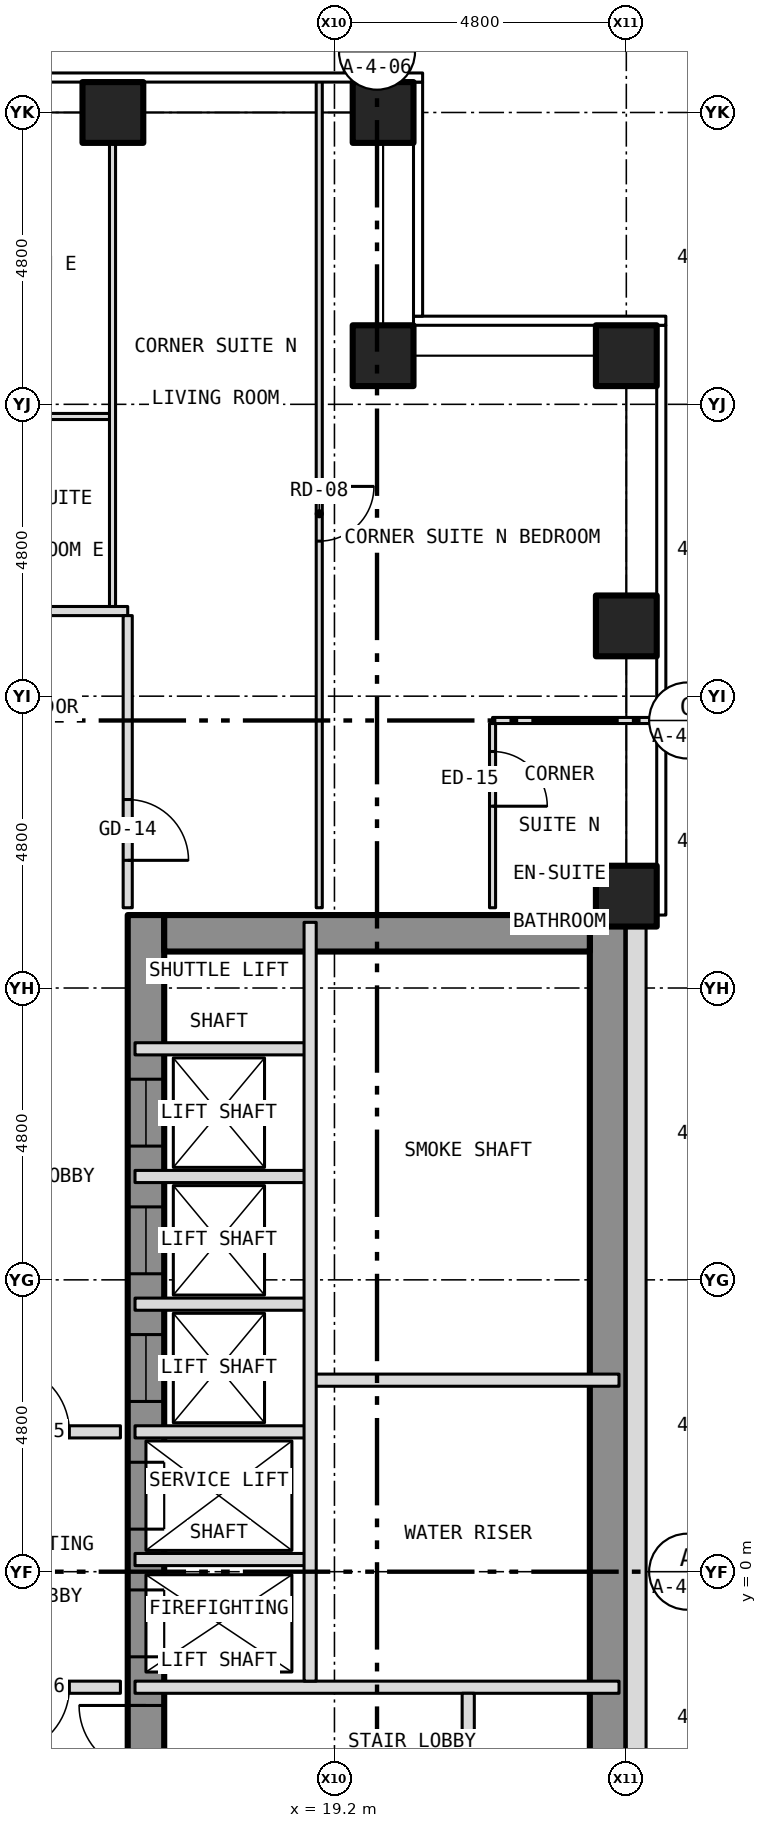
"""IFC4 building model, lengths in metres.
Left out: names, types, materials, properties, quantities, classifications, styles, units other than length and angle.
Written with IfcOpenShell. Run it as: python <this file> out.ifc"""

import sys

from ifc_helpers import new_model, si_unit, direction, frame, frame_2d, origin, origin_2d, place, context, subcontext, project, spatial, rectangle, hollow_rectangle, extrude, element, fill, save


model = new_model("IFC4")
c1 = context("Model", 3, precision=1e-05, world=origin(), true_north=direction((0.0, 1.0)))
c2 = subcontext(c1, "Body", "Model", "MODEL_VIEW")
j1 = project(units=[si_unit("LENGTHUNIT", "METRE"), si_unit("PLANEANGLEUNIT", "RADIAN")], contexts=[c1])
p1 = place(None, origin())
s1 = spatial("IfcSite", under=j1, at=p1, CompositionType="ELEMENT")
p2 = place(p1, origin())
s2 = spatial("IfcBuilding", under=s1, at=p2, CompositionType="ELEMENT")
p3 = place(p2, frame((0.0, 0.0, 42.5)))
s3 = spatial("IfcBuildingStorey", under=s2, at=p3, CompositionType="ELEMENT", Elevation=42.5)
for number, where, z_axis, x_axis in (
    (1, (15.556, 24.0, -0.15), (0.0, 0.0, 1.0), (1.0, 0.0, 0.0)),
    (2, (20.0, 24.0, -0.15), (0.0, 0.0, 1.0), (1.0, 0.0, 0.0)),
    (3, (24.0, 11.111, -0.15), (0.0, 0.0, 1.0), (1.0, 0.0, 0.0)),
    (4, (24.0, 15.556, -0.15), (0.0, 0.0, 1.0), (1.0, 0.0, 0.0)),
    (5, (24.0, 20.0, -0.15), (0.0, 0.0, 1.0), (1.0, 0.0, 0.0)),
    (6, (20.0, 20.0, -0.15), (0.0, 0.0, 1.0), (1.0, 0.0, 0.0)),
):
    element("IfcColumn", number, at=place(p3, frame(where, z_axis=z_axis, x_axis=x_axis)), inside=s3, PredefinedType="COLUMN", context=c2, shape_type="SweptSolid", body=[
        extrude(hollow_rectangle(XDim=1.0, YDim=1.0, WallThickness=0.06, at=origin_2d()), origin(), (0.0, 0.0, 1.0), 3.5),
    ])
p4 = place(p3, frame((16.1, -10.8, 0.0), z_axis=(0.0, 0.0, 1.0), x_axis=(0.0, 1.0, 0.0)))
e7 = element("IfcWall", 7, at=p4, inside=s3, PredefinedType="SHEAR", context=c2, shape_type="SweptSolid", body=[
    extrude(rectangle(XDim=21.6, YDim=0.6, at=frame_2d((10.8, 0.0))), origin(), (0.0, 0.0, 1.0), 3.25),
])
p5 = place(p4, frame((9.4, 0.0, 0.0)))
e8 = element("IfcOpeningElement", 8, at=p5, cuts=e7, PredefinedType="OPENING", context=c2, shape_type="SweptSolid", body=[
    extrude(rectangle(XDim=1.1, YDim=2.1, at=frame_2d((0.55, 1.05))), frame((0.0, 0.312, 0.0), z_axis=(0.0, -1.0, 0.0), x_axis=(1.0, 0.0, 0.0)), (0.0, 0.0, 1.0), 0.624),
])
p6 = place(p4, frame((11.5, 0.0, 0.0)))
e9 = element("IfcOpeningElement", 9, at=p6, cuts=e7, PredefinedType="OPENING", context=c2, shape_type="SweptSolid", body=[
    extrude(rectangle(XDim=1.1, YDim=2.1, at=frame_2d((0.55, 1.05))), frame((0.0, 0.312, 0.0), z_axis=(0.0, -1.0, 0.0), x_axis=(1.0, 0.0, 0.0)), (0.0, 0.0, 1.0), 0.624),
])
p7 = place(p4, frame((13.6, 0.0, 0.0)))
e10 = element("IfcOpeningElement", 10, at=p7, cuts=e7, PredefinedType="OPENING", context=c2, shape_type="SweptSolid", body=[
    extrude(rectangle(XDim=1.1, YDim=2.1, at=frame_2d((0.55, 1.05))), frame((0.0, 0.312, 0.0), z_axis=(0.0, -1.0, 0.0), x_axis=(1.0, 0.0, 0.0)), (0.0, 0.0, 1.0), 0.624),
])
p8 = place(p4, frame((15.7, 0.0, 0.0)))
e11 = element("IfcOpeningElement", 11, at=p8, cuts=e7, PredefinedType="OPENING", context=c2, shape_type="SweptSolid", body=[
    extrude(rectangle(XDim=1.1, YDim=2.1, at=frame_2d((0.55, 1.05))), frame((0.0, 0.312, 0.0), z_axis=(0.0, -1.0, 0.0), x_axis=(1.0, 0.0, 0.0)), (0.0, 0.0, 1.0), 0.624),
])
p9 = place(p4, frame((17.8, 0.0, 0.0)))
e12 = element("IfcOpeningElement", 12, at=p9, cuts=e7, PredefinedType="OPENING", context=c2, shape_type="SweptSolid", body=[
    extrude(rectangle(XDim=1.1, YDim=2.1, at=frame_2d((0.55, 1.05))), frame((0.0, 0.312, 0.0), z_axis=(0.0, -1.0, 0.0), x_axis=(1.0, 0.0, 0.0)), (0.0, 0.0, 1.0), 0.624),
])
p10 = place(p4, frame((5.642, 0.0, 0.0)))
e13 = element("IfcOpeningElement", 13, at=p10, cuts=e7, PredefinedType="OPENING", context=c2, shape_type="SweptSolid", body=[
    extrude(rectangle(XDim=1.1, YDim=2.1, at=frame_2d((0.55, 1.05))), frame((0.0, 0.312, 0.0), z_axis=(0.0, -1.0, 0.0), x_axis=(1.0, 0.0, 0.0)), (0.0, 0.0, 1.0), 0.624),
])
p11 = place(p4, frame((7.5, 0.0, 0.0)))
e14 = element("IfcOpeningElement", 14, at=p11, cuts=e7, PredefinedType="OPENING", context=c2, shape_type="SweptSolid", body=[
    extrude(rectangle(XDim=1.1, YDim=2.1, at=frame_2d((0.55, 1.05))), frame((0.0, 0.312, 0.0), z_axis=(0.0, -1.0, 0.0), x_axis=(1.0, 0.0, 0.0)), (0.0, 0.0, 1.0), 0.624),
])
p12 = place(p3, frame((23.7, -10.8, 0.0), z_axis=(0.0, 0.0, 1.0), x_axis=(0.0, 1.0, 0.0)))
e15 = element("IfcWall", 15, at=p12, inside=s3, PredefinedType="SHEAR", context=c2, shape_type="SweptSolid", body=[
    extrude(rectangle(XDim=21.6, YDim=0.6, at=frame_2d((10.8, 0.0))), origin(), (0.0, 0.0, 1.0), 3.25),
])
p13 = place(p3, frame((16.4, 10.5, 0.0), z_axis=(0.0, 0.0, 1.0), x_axis=(1.0, 0.0, 0.0)))
e16 = element("IfcWall", 16, at=p13, inside=s3, PredefinedType="SHEAR", context=c2, shape_type="SweptSolid", body=[
    extrude(rectangle(XDim=7.0, YDim=0.6, at=frame_2d((3.5, 0.0))), origin(), (0.0, 0.0, 1.0), 3.25),
])
p14 = place(p3, frame((24.163, -10.8, 0.0), z_axis=(0.0, 0.0, 1.0), x_axis=(0.0, 1.0, 0.0)))
e17 = element("IfcWall", 17, at=p14, inside=s3, PredefinedType="SOLIDWALL", context=c2, shape_type="SweptSolid", body=[
    extrude(rectangle(XDim=21.6, YDim=0.325, at=frame_2d((10.8, 0.0))), origin(), (0.0, 0.0, 1.0), 3.5),
])
p15 = place(p14, frame((2.95, 0.0, 1.0)))
e18 = element("IfcOpeningElement", 18, at=p15, cuts=e17, PredefinedType="OPENING", context=c2, shape_type="SweptSolid", body=[
    extrude(rectangle(XDim=0.6, YDim=1.5, at=frame_2d((0.3, 0.75))), frame((0.0, 0.175, 0.0), z_axis=(0.0, -1.0, 0.0), x_axis=(1.0, 0.0, 0.0)), (0.0, 0.0, 1.0), 0.349),
])
p16 = place(p3, frame((12.4, -1.9, 0.0), z_axis=(0.0, 0.0, 1.0), x_axis=(1.0, 0.0, 0.0)))
e19 = element("IfcWall", 19, at=p16, inside=s3, PredefinedType="PARTITIONING", context=c2, shape_type="SweptSolid", body=[
    extrude(rectangle(XDim=3.28, YDim=0.2, at=frame_2d((1.64, 0.0))), origin(), (0.0, 0.0, 1.0), 3.35),
])
p17 = place(p16, frame((1.34, 0.0, 0.0)))
e20 = element("IfcOpeningElement", 20, at=p17, cuts=e19, PredefinedType="OPENING", context=c2, shape_type="SweptSolid", body=[
    extrude(rectangle(XDim=1.1, YDim=2.1, at=frame_2d((0.55, 1.05))), frame((0.0, 0.112, 0.0), z_axis=(0.0, -1.0, 0.0), x_axis=(1.0, 0.0, 0.0)), (0.0, 0.0, 1.0), 0.224),
])
p18 = place(p3, frame((15.92, -1.9, 0.0), z_axis=(0.0, 0.0, 1.0), x_axis=(1.0, 0.0, 0.0)))
e21 = element("IfcWall", 21, at=p18, inside=s3, PredefinedType="PARTITIONING", context=c2, shape_type="SweptSolid", body=[
    extrude(rectangle(XDim=7.96, YDim=0.2, at=frame_2d((3.98, 0.0))), origin(), (0.0, 0.0, 1.0), 3.25),
])
p19 = place(p3, frame((15.92, 0.2, 0.0), z_axis=(0.0, 0.0, 1.0), x_axis=(1.0, 0.0, 0.0)))
e22 = element("IfcWall", 22, at=p19, inside=s3, PredefinedType="PARTITIONING", context=c2, shape_type="SweptSolid", body=[
    extrude(rectangle(XDim=2.88, YDim=0.2, at=frame_2d((1.44, 0.0))), origin(), (0.0, 0.0, 1.0), 3.25),
])
p20 = place(p3, frame((12.4, 2.3, 0.0), z_axis=(0.0, 0.0, 1.0), x_axis=(1.0, 0.0, 0.0)))
e23 = element("IfcWall", 23, at=p20, inside=s3, PredefinedType="PARTITIONING", context=c2, shape_type="SweptSolid", body=[
    extrude(rectangle(XDim=3.28, YDim=0.2, at=frame_2d((1.64, 0.0))), origin(), (0.0, 0.0, 1.0), 3.35),
])
p21 = place(p20, frame((1.34, 0.0, 0.0)))
e24 = element("IfcOpeningElement", 24, at=p21, cuts=e23, PredefinedType="OPENING", context=c2, shape_type="SweptSolid", body=[
    extrude(rectangle(XDim=1.1, YDim=2.1, at=frame_2d((0.55, 1.05))), frame((0.0, 0.112, 0.0), z_axis=(0.0, -1.0, 0.0), x_axis=(1.0, 0.0, 0.0)), (0.0, 0.0, 1.0), 0.224),
])
p22 = place(p3, frame((15.92, 2.3, 0.0), z_axis=(0.0, 0.0, 1.0), x_axis=(1.0, 0.0, 0.0)))
e25 = element("IfcWall", 25, at=p22, inside=s3, PredefinedType="PARTITIONING", context=c2, shape_type="SweptSolid", body=[
    extrude(rectangle(XDim=2.88, YDim=0.2, at=frame_2d((1.44, 0.0))), origin(), (0.0, 0.0, 1.0), 3.25),
])
p23 = place(p3, frame((18.8, 3.15, 0.0), z_axis=(0.0, 0.0, 1.0), x_axis=(1.0, 0.0, 0.0)))
e26 = element("IfcWall", 26, at=p23, inside=s3, PredefinedType="PARTITIONING", context=c2, shape_type="SweptSolid", body=[
    extrude(rectangle(XDim=5.08, YDim=0.2, at=frame_2d((2.54, 0.0))), origin(), (0.0, 0.0, 1.0), 3.25),
])
for number, where, z_axis, x_axis in (
    (27, (15.92, 4.4, 0.0), (0.0, 0.0, 1.0), (1.0, 0.0, 0.0)),
    (28, (15.92, 6.5, 0.0), (0.0, 0.0, 1.0), (1.0, 0.0, 0.0)),
    (29, (15.92, 8.6, 0.0), (0.0, 0.0, 1.0), (1.0, 0.0, 0.0)),
):
    element("IfcWall", number, at=place(p3, frame(where, z_axis=z_axis, x_axis=x_axis)), inside=s3, PredefinedType="PARTITIONING", context=c2, shape_type="SweptSolid", body=[
        extrude(rectangle(XDim=2.88, YDim=0.2, at=frame_2d((1.44, 0.0))), origin(), (0.0, 0.0, 1.0), 3.25),
    ])
p24 = place(p3, frame((21.8, 14.0, 0.0), z_axis=(0.0, 0.0, 1.0), x_axis=(1.0, 0.0, 0.0)))
e30 = element("IfcWall", 30, at=p24, inside=s3, PredefinedType="PARTITIONING", context=c2, shape_type="SweptSolid", body=[
    extrude(rectangle(XDim=2.73, YDim=0.1, at=frame_2d((1.365, 0.0))), origin(), (0.0, 0.0, 1.0), 3.35),
])
p25 = place(p3, frame((-15.8, 15.8, 0.0), z_axis=(0.0, 0.0, 1.0), x_axis=(1.0, 0.0, 0.0)))
e31 = element("IfcWall", 31, at=p25, inside=s3, PredefinedType="PARTITIONING", context=c2, shape_type="SweptSolid", body=[
    extrude(rectangle(XDim=31.6, YDim=0.15, at=frame_2d((15.8, 0.0))), origin(), (0.0, 0.0, 1.0), 3.35),
])
p26 = place(p25, frame((3.067, 0.0, 0.0)))
e32 = element("IfcOpeningElement", 32, at=p26, cuts=e31, PredefinedType="OPENING", context=c2, shape_type="SweptSolid", body=[
    extrude(rectangle(XDim=1.0, YDim=2.1, at=frame_2d((0.5, 1.05))), frame((0.0, 0.087, 0.0), z_axis=(0.0, -1.0, 0.0), x_axis=(1.0, 0.0, 0.0)), (0.0, 0.0, 1.0), 0.174),
])
p27 = place(p25, frame((6.189, 0.0, 0.0)))
e33 = element("IfcOpeningElement", 33, at=p27, cuts=e31, PredefinedType="OPENING", context=c2, shape_type="SweptSolid", body=[
    extrude(rectangle(XDim=1.0, YDim=2.1, at=frame_2d((0.5, 1.05))), frame((0.0, 0.087, 0.0), z_axis=(0.0, -1.0, 0.0), x_axis=(1.0, 0.0, 0.0)), (0.0, 0.0, 1.0), 0.174),
])
p28 = place(p25, frame((15.311, 0.0, 0.0)))
e34 = element("IfcOpeningElement", 34, at=p28, cuts=e31, PredefinedType="OPENING", context=c2, shape_type="SweptSolid", body=[
    extrude(rectangle(XDim=1.0, YDim=2.1, at=frame_2d((0.5, 1.05))), frame((0.0, 0.087, 0.0), z_axis=(0.0, -1.0, 0.0), x_axis=(1.0, 0.0, 0.0)), (0.0, 0.0, 1.0), 0.174),
])
p29 = place(p25, frame((21.977, 0.0, 0.0)))
e35 = element("IfcOpeningElement", 35, at=p29, cuts=e31, PredefinedType="OPENING", context=c2, shape_type="SweptSolid", body=[
    extrude(rectangle(XDim=1.0, YDim=2.1, at=frame_2d((0.5, 1.05))), frame((0.0, 0.087, 0.0), z_axis=(0.0, -1.0, 0.0), x_axis=(1.0, 0.0, 0.0)), (0.0, 0.0, 1.0), 0.174),
])
p30 = place(p25, frame((27.534, 0.0, 0.0)))
e36 = element("IfcOpeningElement", 36, at=p30, cuts=e31, PredefinedType="OPENING", context=c2, shape_type="SweptSolid", body=[
    extrude(rectangle(XDim=1.0, YDim=2.1, at=frame_2d((0.5, 1.05))), frame((0.0, 0.087, 0.0), z_axis=(0.0, -1.0, 0.0), x_axis=(1.0, 0.0, 0.0)), (0.0, 0.0, 1.0), 0.174),
])
p31 = place(p3, frame((13.35, 19.0, 0.0), z_axis=(0.0, 0.0, 1.0), x_axis=(1.0, 0.0, 0.0)))
e37 = element("IfcWall", 37, at=p31, inside=s3, PredefinedType="PARTITIONING", context=c2, shape_type="SweptSolid", body=[
    extrude(rectangle(XDim=2.2, YDim=0.1, at=frame_2d((1.1, 0.0))), origin(), (0.0, 0.0, 1.0), 3.35),
])
p32 = place(p3, frame((15.55, 15.875, 0.0), z_axis=(0.0, 0.0, 1.0), x_axis=(0.0, 1.0, 0.0)))
e38 = element("IfcWall", 38, at=p32, inside=s3, PredefinedType="PARTITIONING", context=c2, shape_type="SweptSolid", body=[
    extrude(rectangle(XDim=8.005, YDim=0.1, at=frame_2d((4.002, 0.0))), origin(), (0.0, 0.0, 1.0), 3.35),
])
p33 = place(p3, frame((15.8, 10.92, 0.0), z_axis=(0.0, 0.0, 1.0), x_axis=(0.0, 1.0, 0.0)))
e39 = element("IfcWall", 39, at=p33, inside=s3, PredefinedType="PARTITIONING", context=c2, shape_type="SweptSolid", body=[
    extrude(rectangle(XDim=4.805, YDim=0.15, at=frame_2d((2.403, 0.0))), origin(), (0.0, 0.0, 1.0), 3.35),
])
p34 = place(p33, frame((0.78, 0.0, 0.0)))
e40 = element("IfcOpeningElement", 40, at=p34, cuts=e39, PredefinedType="OPENING", context=c2, shape_type="SweptSolid", body=[
    extrude(rectangle(XDim=1.0, YDim=2.1, at=frame_2d((0.5, 1.05))), frame((0.0, 0.087, 0.0), z_axis=(0.0, -1.0, 0.0), x_axis=(1.0, 0.0, 0.0)), (0.0, 0.0, 1.0), 0.174),
])
p35 = place(p3, frame((18.8, -1.8, 0.0), z_axis=(0.0, 0.0, 1.0), x_axis=(0.0, 1.0, 0.0)))
e41 = element("IfcWall", 41, at=p35, inside=s3, PredefinedType="PARTITIONING", context=c2, shape_type="SweptSolid", body=[
    extrude(rectangle(XDim=12.48, YDim=0.2, at=frame_2d((6.24, 0.0))), origin(), (0.0, 0.0, 1.0), 3.25),
])
p36 = place(p3, frame((18.95, 10.92, 0.0), z_axis=(0.0, 0.0, 1.0), x_axis=(0.0, 1.0, 0.0)))
e42 = element("IfcWall", 42, at=p36, inside=s3, PredefinedType="PARTITIONING", context=c2, shape_type="SweptSolid", body=[
    extrude(rectangle(XDim=13.61, YDim=0.1, at=frame_2d((6.805, 0.0))), origin(), (0.0, 0.0, 1.0), 3.35),
])
p37 = place(p36, frame((6.03, 0.0, 0.0)))
e43 = element("IfcOpeningElement", 43, at=p37, cuts=e42, PredefinedType="OPENING", context=c2, shape_type="SweptSolid", body=[
    extrude(rectangle(XDim=0.9, YDim=2.1, at=frame_2d((0.45, 1.05))), frame((0.0, 0.062, 0.0), z_axis=(0.0, -1.0, 0.0), x_axis=(1.0, 0.0, 0.0)), (0.0, 0.0, 1.0), 0.124),
])
p38 = place(p3, frame((21.4, -10.68, 0.0), z_axis=(0.0, 0.0, 1.0), x_axis=(0.0, 1.0, 0.0)))
e44 = element("IfcWall", 44, at=p38, inside=s3, PredefinedType="PARTITIONING", context=c2, shape_type="SweptSolid", body=[
    extrude(rectangle(XDim=8.68, YDim=0.2, at=frame_2d((4.34, 0.0))), origin(), (0.0, 0.0, 1.0), 3.25),
])
p39 = place(p38, frame((0.899, 0.0, 0.0)))
e45 = element("IfcOpeningElement", 45, at=p39, cuts=e44, PredefinedType="OPENING", context=c2, shape_type="SweptSolid", body=[
    extrude(rectangle(XDim=0.9, YDim=2.1, at=frame_2d((0.45, 1.05))), frame((0.0, 0.112, 0.0), z_axis=(0.0, -1.0, 0.0), x_axis=(1.0, 0.0, 0.0)), (0.0, 0.0, 1.0), 0.224),
])
p40 = place(p38, frame((5.349, 0.0, 0.0)))
e46 = element("IfcOpeningElement", 46, at=p40, cuts=e44, PredefinedType="OPENING", context=c2, shape_type="SweptSolid", body=[
    extrude(rectangle(XDim=0.9, YDim=2.1, at=frame_2d((0.45, 1.05))), frame((0.0, 0.112, 0.0), z_axis=(0.0, -1.0, 0.0), x_axis=(1.0, 0.0, 0.0)), (0.0, 0.0, 1.0), 0.224),
])
p41 = place(p3, frame((21.8, 10.92, 0.0), z_axis=(0.0, 0.0, 1.0), x_axis=(0.0, 1.0, 0.0)))
e47 = element("IfcWall", 47, at=p41, inside=s3, PredefinedType="PARTITIONING", context=c2, shape_type="SweptSolid", body=[
    extrude(rectangle(XDim=3.03, YDim=0.1, at=frame_2d((1.515, 0.0))), origin(), (0.0, 0.0, 1.0), 3.35),
])
p42 = place(p41, frame((1.67, 0.0, 0.0)))
e48 = element("IfcOpeningElement", 48, at=p42, cuts=e47, PredefinedType="OPENING", context=c2, shape_type="SweptSolid", body=[
    extrude(rectangle(XDim=0.9, YDim=2.1, at=frame_2d((0.45, 1.05))), frame((0.0, 0.062, 0.0), z_axis=(0.0, -1.0, 0.0), x_axis=(1.0, 0.0, 0.0)), (0.0, 0.0, 1.0), 0.124),
])
p43 = place(p5, origin())
e49 = element("IfcDoor", 49, at=p43, inside=s3, OperationType="SLIDING_TO_LEFT", PredefinedType="DOOR", context=c2, shape_type="SweptSolid", body=[
    extrude(rectangle(XDim=1.1, YDim=2.1, at=frame_2d((0.55, 1.05))), frame((0.0, 0.025, 0.0), z_axis=(0.0, -1.0, 0.0), x_axis=(1.0, 0.0, 0.0)), (0.0, 0.0, 1.0), 0.05),
])
fill(e8, e49)
p44 = place(p6, origin())
e50 = element("IfcDoor", 50, at=p44, inside=s3, OperationType="SLIDING_TO_LEFT", PredefinedType="DOOR", context=c2, shape_type="SweptSolid", body=[
    extrude(rectangle(XDim=1.1, YDim=2.1, at=frame_2d((0.55, 1.05))), frame((0.0, 0.025, 0.0), z_axis=(0.0, -1.0, 0.0), x_axis=(1.0, 0.0, 0.0)), (0.0, 0.0, 1.0), 0.05),
])
fill(e9, e50)
p45 = place(p7, origin())
e51 = element("IfcDoor", 51, at=p45, inside=s3, OperationType="SLIDING_TO_LEFT", PredefinedType="DOOR", context=c2, shape_type="SweptSolid", body=[
    extrude(rectangle(XDim=1.1, YDim=2.1, at=frame_2d((0.55, 1.05))), frame((0.0, 0.025, 0.0), z_axis=(0.0, -1.0, 0.0), x_axis=(1.0, 0.0, 0.0)), (0.0, 0.0, 1.0), 0.05),
])
fill(e10, e51)
p46 = place(p8, origin())
e52 = element("IfcDoor", 52, at=p46, inside=s3, OperationType="SLIDING_TO_LEFT", PredefinedType="DOOR", context=c2, shape_type="SweptSolid", body=[
    extrude(rectangle(XDim=1.1, YDim=2.1, at=frame_2d((0.55, 1.05))), frame((0.0, 0.025, 0.0), z_axis=(0.0, -1.0, 0.0), x_axis=(1.0, 0.0, 0.0)), (0.0, 0.0, 1.0), 0.05),
])
fill(e11, e52)
p47 = place(p9, origin())
e53 = element("IfcDoor", 53, at=p47, inside=s3, OperationType="SLIDING_TO_LEFT", PredefinedType="DOOR", context=c2, shape_type="SweptSolid", body=[
    extrude(rectangle(XDim=1.1, YDim=2.1, at=frame_2d((0.55, 1.05))), frame((0.0, 0.025, 0.0), z_axis=(0.0, -1.0, 0.0), x_axis=(1.0, 0.0, 0.0)), (0.0, 0.0, 1.0), 0.05),
])
fill(e12, e53)
p48 = place(p11, origin())
e54 = element("IfcDoor", 54, at=p48, inside=s3, OperationType="SINGLE_SWING_RIGHT", PredefinedType="DOOR", context=c2, shape_type="SweptSolid", body=[
    extrude(rectangle(XDim=1.1, YDim=2.1, at=frame_2d((0.55, 1.05))), frame((0.0, 0.025, 0.0), z_axis=(0.0, -1.0, 0.0), x_axis=(1.0, 0.0, 0.0)), (0.0, 0.0, 1.0), 0.05),
])
fill(e14, e54)
p49 = place(p21, origin())
e55 = element("IfcDoor", 55, at=p49, inside=s3, OperationType="SINGLE_SWING_LEFT", PredefinedType="DOOR", context=c2, shape_type="SweptSolid", body=[
    extrude(rectangle(XDim=1.1, YDim=2.1, at=frame_2d((0.55, 1.05))), frame((0.0, 0.025, 0.0), z_axis=(0.0, -1.0, 0.0), x_axis=(1.0, 0.0, 0.0)), (0.0, 0.0, 1.0), 0.05),
])
fill(e24, e55)
p50 = place(p17, origin())
e56 = element("IfcDoor", 56, at=p50, inside=s3, OperationType="SINGLE_SWING_LEFT", PredefinedType="DOOR", context=c2, shape_type="SweptSolid", body=[
    extrude(rectangle(XDim=1.1, YDim=2.1, at=frame_2d((0.55, 1.05))), frame((0.0, 0.025, 0.0), z_axis=(0.0, -1.0, 0.0), x_axis=(1.0, 0.0, 0.0)), (0.0, 0.0, 1.0), 0.05),
])
fill(e20, e56)
p51 = place(p34, origin())
e57 = element("IfcDoor", 57, at=p51, inside=s3, OperationType="SINGLE_SWING_LEFT", PredefinedType="DOOR", context=c2, shape_type="SweptSolid", body=[
    extrude(rectangle(XDim=1.0, YDim=2.1, at=frame_2d((0.5, 1.05))), frame((0.0, 0.025, 0.0), z_axis=(0.0, -1.0, 0.0), x_axis=(1.0, 0.0, 0.0)), (0.0, 0.0, 1.0), 0.05),
])
fill(e40, e57)
p52 = place(p37, origin())
e58 = element("IfcDoor", 58, at=p52, inside=s3, OperationType="SINGLE_SWING_RIGHT", PredefinedType="DOOR", context=c2, shape_type="SweptSolid", body=[
    extrude(rectangle(XDim=0.9, YDim=2.1, at=frame_2d((0.45, 1.05))), frame((0.0, 0.025, 0.0), z_axis=(0.0, -1.0, 0.0), x_axis=(1.0, 0.0, 0.0)), (0.0, 0.0, 1.0), 0.05),
])
fill(e43, e58)
p53 = place(p42, origin())
e59 = element("IfcDoor", 59, at=p53, inside=s3, OperationType="SINGLE_SWING_LEFT", PredefinedType="DOOR", context=c2, shape_type="SweptSolid", body=[
    extrude(rectangle(XDim=0.9, YDim=2.1, at=frame_2d((0.45, 1.05))), frame((0.0, 0.025, 0.0), z_axis=(0.0, -1.0, 0.0), x_axis=(1.0, 0.0, 0.0)), (0.0, 0.0, 1.0), 0.05),
])
fill(e48, e59)
save(model, sys.argv[1])
